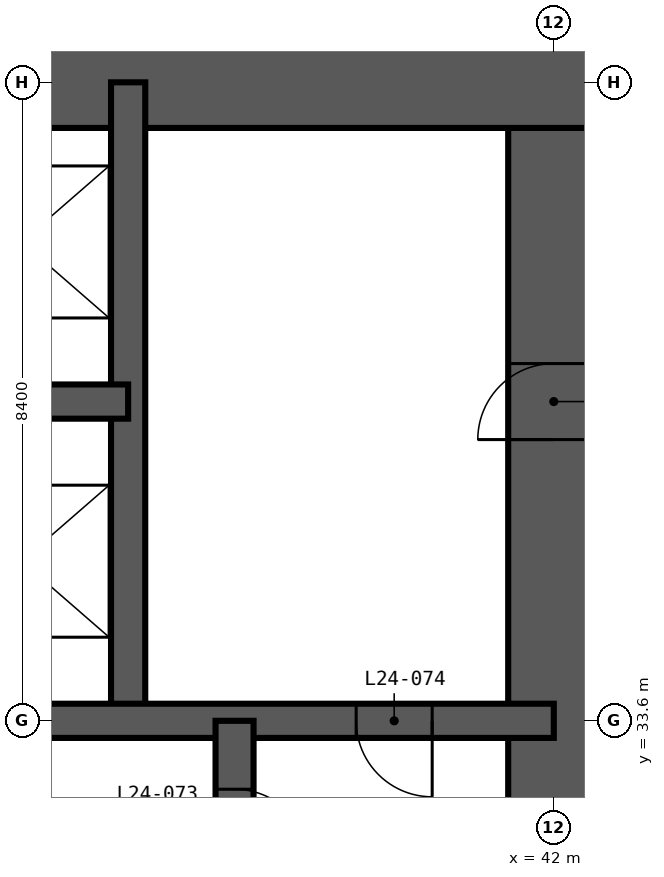
"""IFC4 building model, lengths in metres.
Left out: names, types, materials, properties, quantities, classifications, styles, units other than length and angle.
Written with IfcOpenShell. Run it as: python <this file> out.ifc"""

import sys

from ifc_helpers import new_model, si_unit, direction, frame, frame_2d, origin, place, context, subcontext, project, spatial, rectangle, extrude, element, fill, save


model = new_model("IFC4")
c1 = context("Model", 3, precision=1e-05, world=origin(), true_north=direction((0.0, 1.0)))
c2 = subcontext(c1, "Body", "Model", "MODEL_VIEW")
j1 = project(units=[si_unit("LENGTHUNIT", "METRE"), si_unit("PLANEANGLEUNIT", "RADIAN")], contexts=[c1])
p1 = place(None, origin())
s1 = spatial("IfcSite", under=j1, at=p1, CompositionType="ELEMENT")
p2 = place(p1, origin())
s2 = spatial("IfcBuilding", under=s1, at=p2, CompositionType="ELEMENT")
p3 = place(p2, frame((0.0, 0.0, 97.2)))
s3 = spatial("IfcBuildingStorey", under=s2, at=p3, CompositionType="ELEMENT", Elevation=97.2)
p4 = place(p3, frame((42.0, 17.4, -0.35), z_axis=(0.0, 0.0, 1.0), x_axis=(0.0, 1.0, 0.0)))
e1 = element("IfcWall", 1, at=p4, inside=s3, PredefinedType="SHEAR", context=c2, shape_type="SweptSolid", body=[
    extrude(rectangle(XDim=24.0, YDim=1.2, at=frame_2d((12.0, 0.0))), origin(), (0.0, 0.0, 1.0), 3.6),
])
p5 = place(p4, frame((0.2, 0.0, 0.35)))
e2 = element("IfcOpeningElement", 2, at=p5, cuts=e1, PredefinedType="OPENING", context=c2, shape_type="SweptSolid", body=[
    extrude(rectangle(XDim=1.2, YDim=2.2, at=frame_2d((0.6, 1.1))), frame((0.0, 0.61, 0.0), z_axis=(0.0, -1.0, 0.0), x_axis=(1.0, 0.0, 0.0)), (0.0, 0.0, 1.0), 1.22),
])
p6 = place(p4, frame((11.1, 0.0, 0.35)))
e3 = element("IfcOpeningElement", 3, at=p6, cuts=e1, PredefinedType="OPENING", context=c2, shape_type="SweptSolid", body=[
    extrude(rectangle(XDim=1.8, YDim=2.2, at=frame_2d((0.9, 1.1))), frame((0.0, 0.61, 0.0), z_axis=(0.0, -1.0, 0.0), x_axis=(1.0, 0.0, 0.0)), (0.0, 0.0, 1.0), 1.22),
])
p7 = place(p4, frame((19.9, 0.0, 0.35)))
e4 = element("IfcOpeningElement", 4, at=p7, cuts=e1, PredefinedType="OPENING", context=c2, shape_type="SweptSolid", body=[
    extrude(rectangle(XDim=1.0, YDim=2.1, at=frame_2d((0.5, 1.05))), frame((0.0, 0.61, 0.0), z_axis=(0.0, -1.0, 0.0), x_axis=(1.0, 0.0, 0.0)), (0.0, 0.0, 1.0), 1.22),
])
p8 = place(p3, frame((42.6, 42.0, -0.35), z_axis=(0.0, 0.0, 1.0), x_axis=(-1.0, 0.0, 0.0)))
e5 = element("IfcWall", 5, at=p8, inside=s3, PredefinedType="SHEAR", context=c2, shape_type="SweptSolid", body=[
    extrude(rectangle(XDim=26.4, YDim=1.2, at=frame_2d((13.2, 0.0))), origin(), (0.0, 0.0, 1.0), 3.6),
])
p9 = place(p8, frame((21.1, 0.0, 0.35)))
e6 = element("IfcOpeningElement", 6, at=p9, cuts=e5, PredefinedType="OPENING", context=c2, shape_type="SweptSolid", body=[
    extrude(rectangle(XDim=1.0, YDim=2.1, at=frame_2d((0.5, 1.05))), frame((0.0, 0.61, 0.0), z_axis=(0.0, -1.0, 0.0), x_axis=(1.0, 0.0, 0.0)), (0.0, 0.0, 1.0), 1.22),
])
p10 = place(p8, frame((10.5, 0.0, 0.35)))
e7 = element("IfcOpeningElement", 7, at=p10, cuts=e5, PredefinedType="OPENING", context=c2, shape_type="SweptSolid", body=[
    extrude(rectangle(XDim=1.2, YDim=2.2, at=frame_2d((0.6, 1.1))), frame((0.0, 0.61, 0.0), z_axis=(0.0, -1.0, 0.0), x_axis=(1.0, 0.0, 0.0)), (0.0, 0.0, 1.0), 1.22),
])
p11 = place(p3, frame((36.4, 33.6, -0.35), z_axis=(0.0, 0.0, 1.0), x_axis=(0.0, 1.0, 0.0)))
e8 = element("IfcWall", 8, at=p11, inside=s3, PredefinedType="SHEAR", context=c2, shape_type="SweptSolid", body=[
    extrude(rectangle(XDim=8.4, YDim=0.45, at=frame_2d((4.2, 0.0))), origin(), (0.0, 0.0, 1.0), 3.6),
])
p12 = place(p3, frame((16.8, 33.6, -0.35), z_axis=(0.0, 0.0, 1.0), x_axis=(1.0, 0.0, 0.0)))
e9 = element("IfcWall", 9, at=p12, inside=s3, PredefinedType="SHEAR", context=c2, shape_type="SweptSolid", body=[
    extrude(rectangle(XDim=25.2, YDim=0.45, at=frame_2d((12.6, 0.0))), origin(), (0.0, 0.0, 1.0), 3.6),
])
p13 = place(p12, frame((22.6, 0.0, 0.35)))
e10 = element("IfcOpeningElement", 10, at=p13, cuts=e9, PredefinedType="OPENING", context=c2, shape_type="SweptSolid", body=[
    extrude(rectangle(XDim=1.0, YDim=2.1, at=frame_2d((0.5, 1.05))), frame((0.0, 0.235, 0.0), z_axis=(0.0, -1.0, 0.0), x_axis=(1.0, 0.0, 0.0)), (0.0, 0.0, 1.0), 0.47),
])
p14 = place(p3, frame((33.6, 37.8, -0.35), z_axis=(0.0, 0.0, 1.0), x_axis=(1.0, 0.0, 0.0)))
e11 = element("IfcWall", 11, at=p14, inside=s3, PredefinedType="SHEAR", context=c2, shape_type="SweptSolid", body=[
    extrude(rectangle(XDim=2.8, YDim=0.45, at=frame_2d((1.4, 0.0))), origin(), (0.0, 0.0, 1.0), 3.6),
])
p15 = place(p3, frame((37.8, 30.8, -0.35), z_axis=(0.0, 0.0, 1.0), x_axis=(0.0, 1.0, 0.0)))
e12 = element("IfcWall", 12, at=p15, inside=s3, PredefinedType="SHEAR", context=c2, shape_type="SweptSolid", body=[
    extrude(rectangle(XDim=2.8, YDim=0.5, at=frame_2d((1.4, 0.0))), origin(), (0.0, 0.0, 1.0), 3.6),
])
p16 = place(p15, frame((0.9, 0.0, 0.35)))
e13 = element("IfcOpeningElement", 13, at=p16, cuts=e12, PredefinedType="OPENING", context=c2, shape_type="SweptSolid", body=[
    extrude(rectangle(XDim=1.0, YDim=2.1, at=frame_2d((0.5, 1.05))), frame((0.0, 0.26, 0.0), z_axis=(0.0, -1.0, 0.0), x_axis=(1.0, 0.0, 0.0)), (0.0, 0.0, 1.0), 0.52),
])
p17 = place(p16, frame((1.0, 0.0, 0.0), z_axis=(0.0, 0.0, 1.0), x_axis=(-1.0, 0.0, 0.0)))
e14 = element("IfcDoor", 14, at=p17, inside=s3, OperationType="SINGLE_SWING_RIGHT", PredefinedType="DOOR", context=c2, shape_type="SweptSolid", body=[
    extrude(rectangle(XDim=1.0, YDim=2.1, at=frame_2d((0.5, 1.05))), frame((0.0, 0.025, 0.0), z_axis=(0.0, -1.0, 0.0), x_axis=(1.0, 0.0, 0.0)), (0.0, 0.0, 1.0), 0.05),
])
fill(e13, e14)
p18 = place(p13, frame((1.0, 0.0, 0.0), z_axis=(0.0, 0.0, 1.0), x_axis=(-1.0, 0.0, 0.0)))
e15 = element("IfcDoor", 15, at=p18, inside=s3, OperationType="SINGLE_SWING_LEFT", PredefinedType="DOOR", context=c2, shape_type="SweptSolid", body=[
    extrude(rectangle(XDim=1.0, YDim=2.1, at=frame_2d((0.5, 1.05))), frame((0.0, 0.025, 0.0), z_axis=(0.0, -1.0, 0.0), x_axis=(1.0, 0.0, 0.0)), (0.0, 0.0, 1.0), 0.05),
])
fill(e10, e15)
p19 = place(p7, origin())
e16 = element("IfcDoor", 16, at=p19, inside=s3, OperationType="SINGLE_SWING_LEFT", PredefinedType="DOOR", context=c2, shape_type="SweptSolid", body=[
    extrude(rectangle(XDim=1.0, YDim=2.1, at=frame_2d((0.5, 1.05))), frame((0.0, 0.025, 0.0), z_axis=(0.0, -1.0, 0.0), x_axis=(1.0, 0.0, 0.0)), (0.0, 0.0, 1.0), 0.05),
])
fill(e4, e16)
save(model, sys.argv[1])
